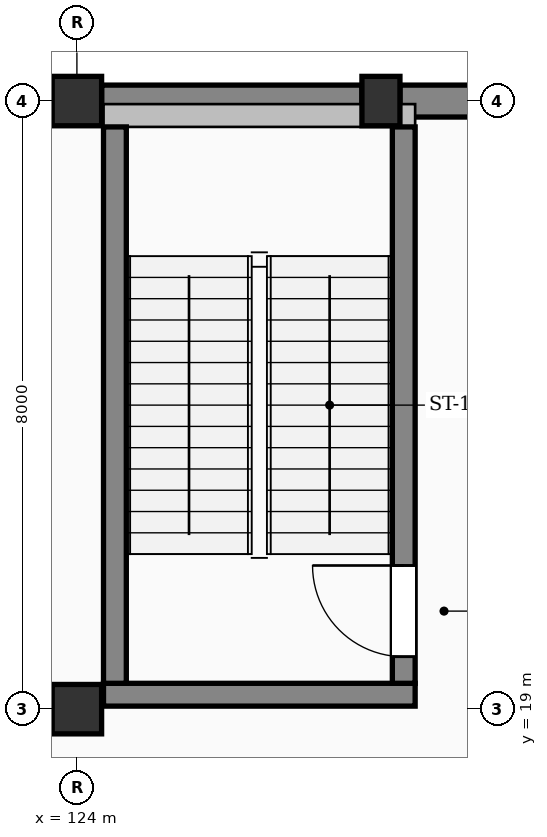
"""IFC4 building model, lengths in metres.
Left out: names, types, materials, properties, quantities, classifications, styles, units other than length and angle.
Written with IfcOpenShell. Run it as: python <this file> out.ifc"""

import sys

from ifc_helpers import new_model, si_unit, direction, frame, frame_2d, origin, origin_2d, place, context, subcontext, project, spatial, rectangle, extrude, element, fill, save


model = new_model("IFC4")
c1 = context("Model", 3, precision=1e-05, world=origin(), true_north=direction((0.0, 1.0)))
c2 = subcontext(c1, "Body", "Model", "MODEL_VIEW")
j1 = project(units=[si_unit("LENGTHUNIT", "METRE"), si_unit("PLANEANGLEUNIT", "RADIAN")], contexts=[c1])
p1 = place(None, origin())
s1 = spatial("IfcSite", under=j1, at=p1, CompositionType="ELEMENT")
p2 = place(p1, origin())
s2 = spatial("IfcBuilding", under=s1, at=p2, CompositionType="ELEMENT")
p3 = place(p2, frame((0.0, 0.0, -4.8)))
s3 = spatial("IfcBuildingStorey", under=s2, at=p3, CompositionType="ELEMENT", Elevation=-4.8)
for number, where, z_axis, x_axis in (
    (1, (124.0, 19.0, -0.38), (0.0, 0.0, 1.0), (1.0, 0.0, 0.0)),
    (2, (124.0, 27.0, -0.38), (0.0, 0.0, 1.0), (1.0, 0.0, 0.0)),
):
    element("IfcColumn", number, at=place(p3, frame(where, z_axis=z_axis, x_axis=x_axis)), inside=s3, PredefinedType="COLUMN", context=c2, shape_type="SweptSolid", body=[
        extrude(rectangle(XDim=0.65, YDim=0.65, at=origin_2d()), origin(), (0.0, 0.0, 1.0), 5.18),
    ])
p4 = place(p3, frame((128.0, 27.0, -0.38), z_axis=(0.0, 0.0, 1.0), x_axis=(1.0, 0.0, 0.0)))
e3 = element("IfcColumn", 3, at=p4, inside=s3, PredefinedType="PILASTER", context=c2, shape_type="SweptSolid", body=[
    extrude(rectangle(XDim=0.5, YDim=0.65, at=origin_2d()), origin(), (0.0, 0.0, 1.0), 5.18),
])
p5 = place(p3, frame((120.2, 27.0, 0.0), z_axis=(0.0, 0.0, 1.0), x_axis=(1.0, 0.0, 0.0)))
e4 = element("IfcWall", 4, at=p5, inside=s3, PredefinedType="USERDEFINED", context=c2, shape_type="SweptSolid", body=[
    extrude(rectangle(XDim=3.475, YDim=0.42, at=frame_2d((1.738, 0.0))), origin(), (0.0, 0.0, 1.0), 3.85),
])
for number, where, z_axis, x_axis in (
    (5, (124.325, 27.0, 0.0), (0.0, 0.0, 1.0), (1.0, 0.0, 0.0)),
    (6, (128.25, 27.0, 0.0), (0.0, 0.0, 1.0), (1.0, 0.0, 0.0)),
):
    element("IfcWall", number, at=place(p3, frame(where, z_axis=z_axis, x_axis=x_axis)), inside=s3, PredefinedType="USERDEFINED", context=c2, shape_type="SweptSolid", body=[
        extrude(rectangle(XDim=3.425, YDim=0.42, at=frame_2d((1.712, 0.0))), origin(), (0.0, 0.0, 1.0), 3.85),
    ])
p6 = place(p3, frame((124.35, 19.19, -0.38), z_axis=(0.0, 0.0, 1.0), x_axis=(1.0, 0.0, 0.0)))
e7 = element("IfcWall", 7, at=p6, inside=s3, PredefinedType="SHEAR", context=c2, shape_type="SweptSolid", body=[
    extrude(rectangle(XDim=4.1, YDim=0.3, at=frame_2d((2.05, 0.0))), origin(), (0.0, 0.0, 1.0), 4.88),
])
p7 = place(p3, frame((128.45, 26.81, 3.85), z_axis=(0.0, 0.0, 1.0), x_axis=(-1.0, 0.0, 0.0)))
e8 = element("IfcWall", 8, at=p7, inside=s3, PredefinedType="SHEAR", context=c2, shape_type="SweptSolid", body=[
    extrude(rectangle(XDim=4.1, YDim=0.3, at=frame_2d((2.05, 0.0))), origin(), (0.0, 0.0, 1.0), 0.65),
])
p8 = place(p3, frame((124.5, 19.34, -0.38), z_axis=(0.0, 0.0, 1.0), x_axis=(0.0, 1.0, 0.0)))
e9 = element("IfcWall", 9, at=p8, inside=s3, PredefinedType="SHEAR", context=c2, shape_type="SweptSolid", body=[
    extrude(rectangle(XDim=7.32, YDim=0.3, at=frame_2d((3.66, 0.0))), origin(), (0.0, 0.0, 1.0), 4.88),
])
p9 = place(p3, frame((128.3, 19.34, -0.38), z_axis=(0.0, 0.0, 1.0), x_axis=(0.0, 1.0, 0.0)))
e10 = element("IfcWall", 10, at=p9, inside=s3, PredefinedType="SHEAR", context=c2, shape_type="SweptSolid", body=[
    extrude(rectangle(XDim=7.32, YDim=0.3, at=frame_2d((3.66, 0.0))), origin(), (0.0, 0.0, 1.0), 4.88),
])
p10 = place(p9, frame((0.35, 0.0, 0.38)))
e11 = element("IfcOpeningElement", 11, at=p10, cuts=e10, PredefinedType="OPENING", context=c2, shape_type="SweptSolid", body=[
    extrude(rectangle(XDim=1.2, YDim=2.15, at=frame_2d((0.6, 1.075))), frame((0.0, 0.16, 0.0), z_axis=(0.0, -1.0, 0.0), x_axis=(1.0, 0.0, 0.0)), (0.0, 0.0, 1.0), 0.32),
])
p11 = place(p10, origin())
e12 = element("IfcDoor", 12, at=p11, inside=s3, OperationType="SINGLE_SWING_RIGHT", PredefinedType="DOOR", context=c2, shape_type="SweptSolid", body=[
    extrude(rectangle(XDim=1.2, YDim=2.15, at=frame_2d((0.6, 1.075))), frame((0.0, 0.025, 0.0), z_axis=(0.0, -1.0, 0.0), x_axis=(1.0, 0.0, 0.0)), (0.0, 0.0, 1.0), 0.05),
])
fill(e11, e12)
save(model, sys.argv[1])
